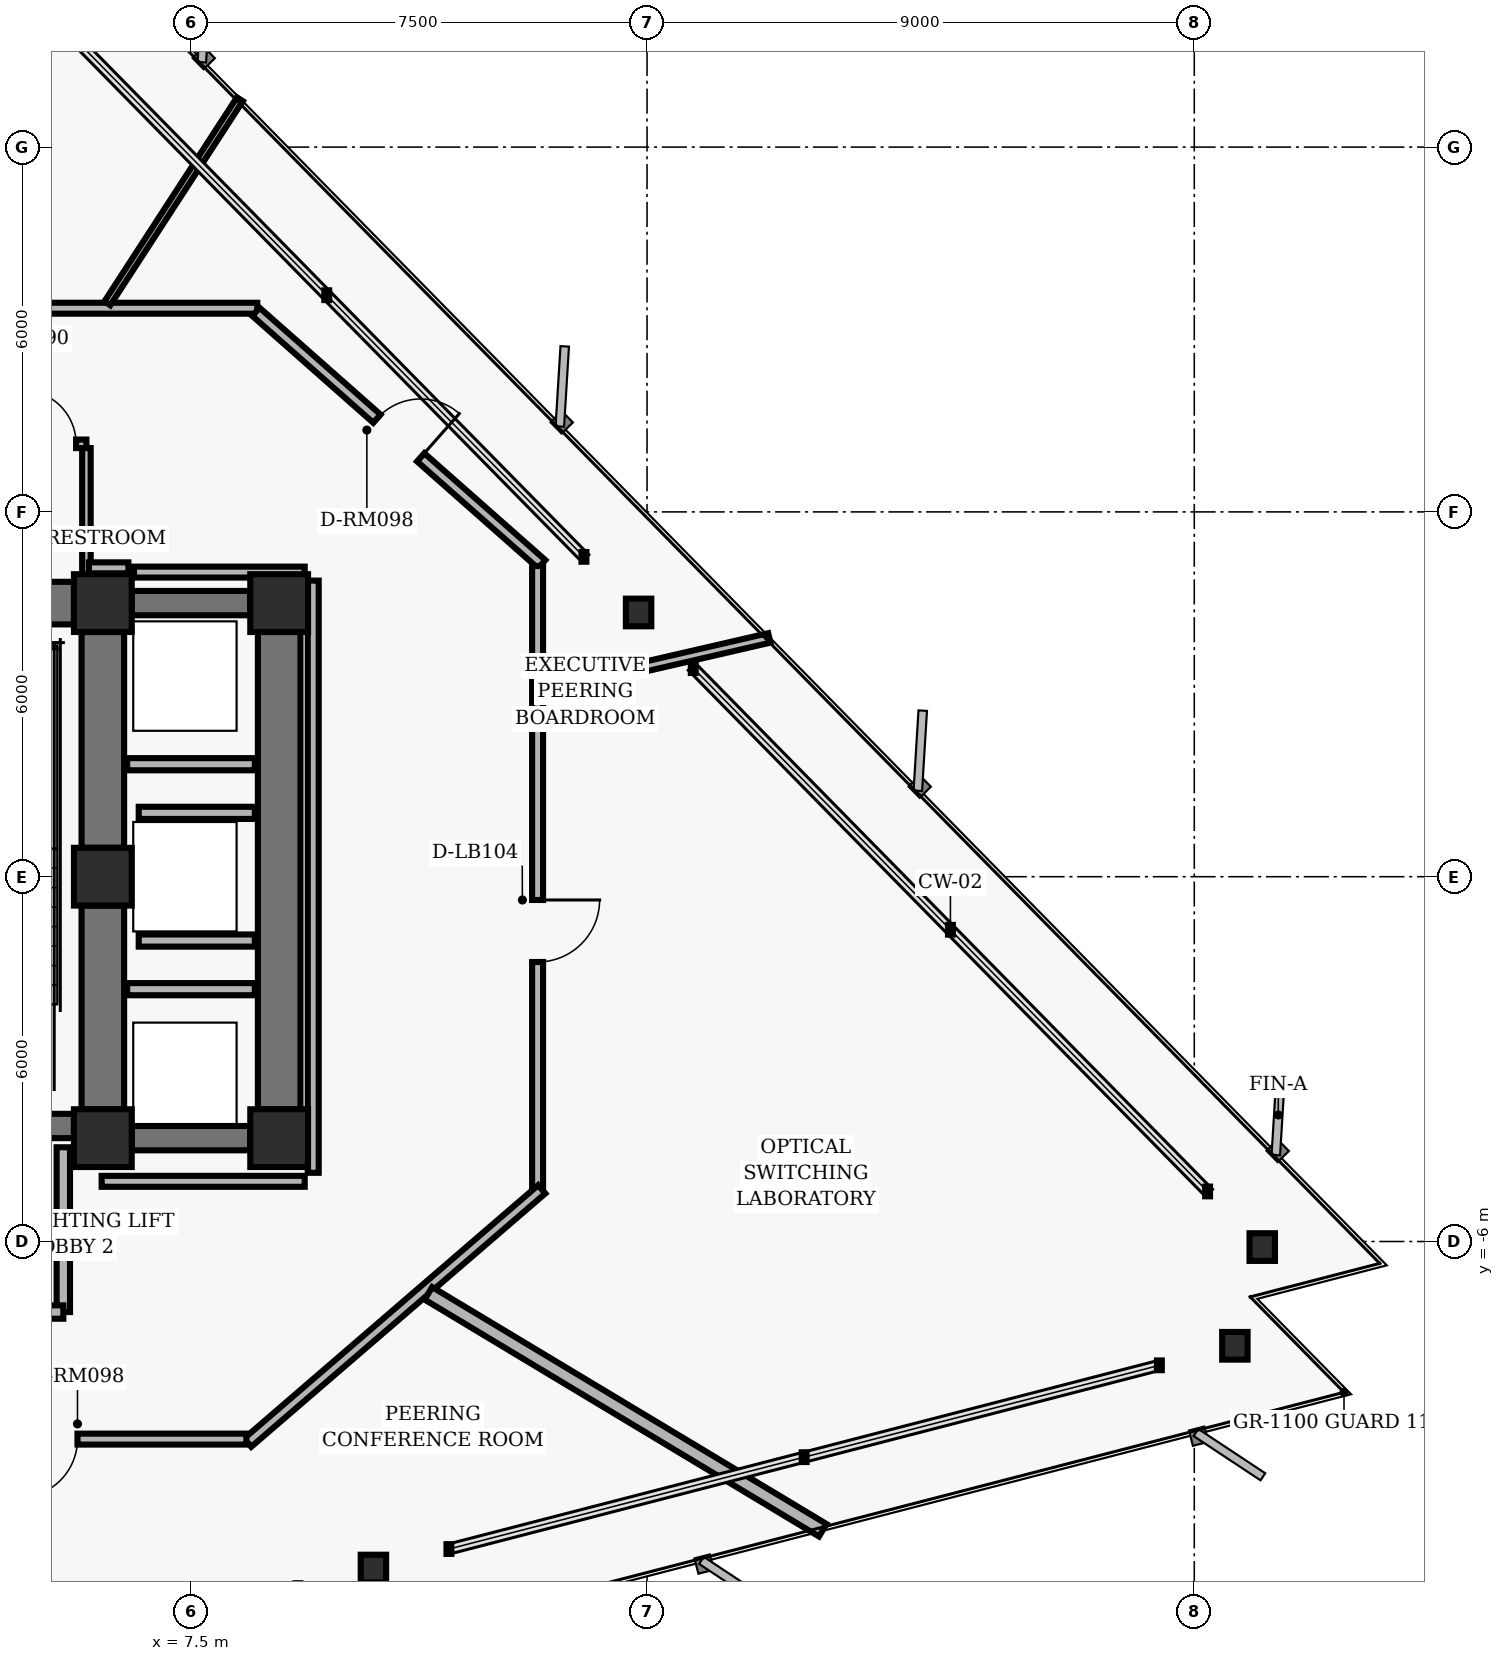
"""IFC4 building model, lengths in metres.
Left out: names, types, materials, properties, quantities, classifications, styles, units other than length and angle.
Written with IfcOpenShell. Run it as: python <this file> out.ifc"""

import sys

from ifc_helpers import new_model, si_unit, direction, frame, frame_2d, origin, origin_2d, place, context, subcontext, project, spatial, rectangle, hollow_rectangle, i_section, extrude, element, fill, save


model = new_model("IFC4")
c1 = context("Model", 3, precision=1e-05, world=origin(), true_north=direction((0.0, 1.0)))
c2 = subcontext(c1, "Body", "Model", "MODEL_VIEW")
j1 = project(units=[si_unit("LENGTHUNIT", "METRE"), si_unit("PLANEANGLEUNIT", "RADIAN")], contexts=[c1])
p1 = place(None, origin())
s1 = spatial("IfcSite", under=j1, at=p1, CompositionType="ELEMENT")
p2 = place(p1, origin())
s2 = spatial("IfcBuilding", under=s1, at=p2, CompositionType="ELEMENT")
p3 = place(p2, frame((0.0, 0.0, 82.56)))
s3 = spatial("IfcBuildingStorey", under=s2, at=p3, CompositionType="ELEMENT", Elevation=82.56)
for number, where, z_axis, x_axis in (
    (1, (6.05, 4.5, 0.0), (0.0, 0.0, 1.0), (1.0, 0.0, 0.0)),
    (2, (6.05, 0.0, 0.0), (0.0, 0.0, 1.0), (1.0, 0.0, 0.0)),
    (3, (6.05, -4.3, 0.0), (0.0, 0.0, 1.0), (1.0, 0.0, 0.0)),
    (4, (8.95, 4.5, 0.0), (0.0, 0.0, 1.0), (1.0, 0.0, 0.0)),
    (5, (8.95, -4.3, 0.0), (0.0, 0.0, 1.0), (1.0, 0.0, 0.0)),
):
    element("IfcColumn", number, at=place(p3, frame(where, z_axis=z_axis, x_axis=x_axis)), inside=s3, PredefinedType="COLUMN", context=c2, shape_type="SweptSolid", body=[
        extrude(hollow_rectangle(XDim=0.95, YDim=0.95, WallThickness=0.06, InnerFilletRadius=0.02, OuterFilletRadius=0.04, at=origin_2d()), origin(), (0.0, 0.0, 1.0), 3.04),
    ])
p4 = place(p3, frame((6.05, 0.475, 0.0), z_axis=(0.0, 0.0, 1.0), x_axis=(0.0, 1.0, 0.0)))
e6 = element("IfcWall", 6, at=p4, inside=s3, PredefinedType="SHEAR", context=c2, shape_type="SweptSolid", body=[
    extrude(rectangle(XDim=3.55, YDim=0.7, at=frame_2d((1.775, 0.0))), origin(), (0.0, 0.0, 1.0), 2.788),
])
p5 = place(p3, frame((6.05, -3.825, 0.0), z_axis=(0.0, 0.0, 1.0), x_axis=(0.0, 1.0, 0.0)))
e7 = element("IfcWall", 7, at=p5, inside=s3, PredefinedType="SHEAR", context=c2, shape_type="SweptSolid", body=[
    extrude(rectangle(XDim=3.35, YDim=0.7, at=frame_2d((1.675, 0.0))), origin(), (0.0, 0.0, 1.0), 2.788),
])
p6 = place(p3, frame((-5.575, -4.1, 0.0), z_axis=(0.0, 0.0, 1.0), x_axis=(1.0, 0.0, 0.0)))
e8 = element("IfcWall", 8, at=p6, inside=s3, PredefinedType="SHEAR", context=c2, shape_type="SweptSolid", body=[
    extrude(rectangle(XDim=11.15, YDim=0.4, at=frame_2d((5.575, 0.0))), origin(), (0.0, 0.0, 1.0), 2.788),
])
p7 = place(p6, frame((1.305, 0.0, 0.0)))
e9 = element("IfcOpeningElement", 9, at=p7, cuts=e8, PredefinedType="OPENING", context=c2, shape_type="SweptSolid", body=[
    extrude(rectangle(XDim=1.1, YDim=2.04, at=frame_2d((0.55, 1.02))), frame((0.0, 0.21, 0.0), z_axis=(0.0, -1.0, 0.0), x_axis=(1.0, 0.0, 0.0)), (0.0, 0.0, 1.0), 0.42),
])
p8 = place(p6, frame((8.745, 0.0, 0.0)))
e10 = element("IfcOpeningElement", 10, at=p8, cuts=e8, PredefinedType="OPENING", context=c2, shape_type="SweptSolid", body=[
    extrude(rectangle(XDim=1.1, YDim=2.04, at=frame_2d((0.55, 1.02))), frame((0.0, 0.21, 0.0), z_axis=(0.0, -1.0, 0.0), x_axis=(1.0, 0.0, 0.0)), (0.0, 0.0, 1.0), 0.42),
])
p9 = place(p6, frame((4.045, 0.0, 0.0)))
e11 = element("IfcOpeningElement", 11, at=p9, cuts=e8, PredefinedType="OPENING", context=c2, shape_type="SweptSolid", body=[
    extrude(rectangle(XDim=1.06, YDim=2.04, at=frame_2d((0.53, 1.02))), frame((0.0, 0.21, 0.0), z_axis=(0.0, -1.0, 0.0), x_axis=(1.0, 0.0, 0.0)), (0.0, 0.0, 1.0), 0.42),
])
p10 = place(p6, frame((6.045, 0.0, 0.0)))
e12 = element("IfcOpeningElement", 12, at=p10, cuts=e8, PredefinedType="OPENING", context=c2, shape_type="SweptSolid", body=[
    extrude(rectangle(XDim=1.06, YDim=2.04, at=frame_2d((0.53, 1.02))), frame((0.0, 0.21, 0.0), z_axis=(0.0, -1.0, 0.0), x_axis=(1.0, 0.0, 0.0)), (0.0, 0.0, 1.0), 0.42),
])
p11 = place(p3, frame((2.05, 4.5, 0.0), z_axis=(0.0, 0.0, 1.0), x_axis=(1.0, 0.0, 0.0)))
e13 = element("IfcWall", 13, at=p11, inside=s3, PredefinedType="SHEAR", context=c2, shape_type="SweptSolid", body=[
    extrude(rectangle(XDim=3.525, YDim=0.7, at=frame_2d((1.762, 0.0))), origin(), (0.0, 0.0, 1.0), 2.788),
])
p12 = place(p3, frame((8.95, -3.825, 0.0), z_axis=(0.0, 0.0, 1.0), x_axis=(0.0, 1.0, 0.0)))
e14 = element("IfcWall", 14, at=p12, inside=s3, PredefinedType="SHEAR", context=c2, shape_type="SweptSolid", body=[
    extrude(rectangle(XDim=7.85, YDim=0.7, at=frame_2d((3.925, 0.0))), origin(), (0.0, 0.0, 1.0), 2.788),
])
for number, where, z_axis, x_axis in (
    (15, (6.525, 4.5, 0.0), (0.0, 0.0, 1.0), (1.0, 0.0, 0.0)),
    (16, (6.525, -4.3, 0.0), (0.0, 0.0, 1.0), (1.0, 0.0, 0.0)),
):
    element("IfcWall", number, at=place(p3, frame(where, z_axis=z_axis, x_axis=x_axis)), inside=s3, PredefinedType="SHEAR", context=c2, shape_type="SweptSolid", body=[
        extrude(rectangle(XDim=1.95, YDim=0.4, at=frame_2d((0.975, 0.0))), origin(), (0.0, 0.0, 1.0), 2.788),
    ])
for number, where, z_axis, x_axis in (
    (17, (25.118, -6.092, 0.0), (0.0, 0.0, 1.0), (1.0, 0.0, 0.0)),
    (18, (14.861, 4.346, 0.0), (0.0, 0.0, 1.0), (1.0, 0.0, 0.0)),
    (19, (10.5, -11.379, 0.0), (0.0, 0.0, 1.0), (1.0, 0.0, 0.0)),
    (20, (24.667, -7.715, 0.0), (0.0, 0.0, 1.0), (1.0, 0.0, 0.0)),
):
    element("IfcColumn", number, at=place(p3, frame(where, z_axis=z_axis, x_axis=x_axis)), inside=s3, PredefinedType="COLUMN", context=c2, shape_type="SweptSolid", body=[
        extrude(i_section(OverallWidth=0.418, OverallDepth=0.455, WebThickness=0.042, FlangeThickness=0.068, FilletRadius=0.025, at=origin_2d()), origin(), (0.0, 0.0, 1.0), 3.04),
    ])
p13 = place(p3, frame((5.4, -7.16, 0.0), z_axis=(0.0, 0.0, 1.0), x_axis=(0.0, 1.0, 0.0)))
e21 = element("IfcWall", 21, at=p13, inside=s3, PredefinedType="PARTITIONING", context=c2, shape_type="SweptSolid", body=[
    extrude(rectangle(XDim=2.71, YDim=0.22, at=frame_2d((1.355, 0.0))), origin(), (0.0, 0.0, 1.0), 2.763),
])
p14 = place(p3, frame((0.0, -7.16, 0.0), z_axis=(0.0, 0.0, 1.0), x_axis=(1.0, 0.0, 0.0)))
e22 = element("IfcWall", 22, at=p14, inside=s3, PredefinedType="PARTITIONING", context=c2, shape_type="SweptSolid", body=[
    extrude(rectangle(XDim=5.4, YDim=0.22, at=frame_2d((2.7, 0.0))), origin(), (0.0, 0.0, 1.0), 2.763),
])
p15 = place(p14, frame((2.05, 0.0, 0.0)))
e23 = element("IfcOpeningElement", 23, at=p15, cuts=e22, PredefinedType="OPENING", context=c2, shape_type="SweptSolid", body=[
    extrude(rectangle(XDim=1.12, YDim=2.02, at=frame_2d((0.56, 1.01))), frame((0.0, 0.12, 0.0), z_axis=(0.0, -1.0, 0.0), x_axis=(1.0, 0.0, 0.0)), (0.0, 0.0, 1.0), 0.24),
])
p16 = place(p3, frame((5.78, 4.95, 0.0), z_axis=(0.0, 0.0, 1.0), x_axis=(0.0, 1.0, 0.0)))
e24 = element("IfcWall", 24, at=p16, inside=s3, PredefinedType="PARTITIONING", context=c2, shape_type="SweptSolid", body=[
    extrude(rectangle(XDim=2.1, YDim=0.14, at=frame_2d((1.05, 0.0))), origin(), (0.0, 0.0, 1.0), 2.763),
])
p17 = place(p3, frame((4.56, 7.12, 0.0), z_axis=(0.0, 0.0, 1.0), x_axis=(1.0, 0.0, 0.0)))
e25 = element("IfcWall", 25, at=p17, inside=s3, PredefinedType="PARTITIONING", context=c2, shape_type="SweptSolid", body=[
    extrude(rectangle(XDim=1.22, YDim=0.14, at=frame_2d((0.61, 0.0))), origin(), (0.0, 0.0, 1.0), 2.763),
])
p18 = place(p17, frame((0.17, 0.0, 0.0)))
e26 = element("IfcOpeningElement", 26, at=p18, cuts=e25, PredefinedType="OPENING", context=c2, shape_type="SweptSolid", body=[
    extrude(rectangle(XDim=0.88, YDim=2.02, at=frame_2d((0.44, 1.01))), frame((0.0, 0.08, 0.0), z_axis=(0.0, -1.0, 0.0), x_axis=(1.0, 0.0, 0.0)), (0.0, 0.0, 1.0), 0.16),
])
for number, where, z_axis, x_axis in (
    (27, (6.45, -1.85, 0.0), (0.0, 0.0, 1.0), (1.0, 0.0, 0.0)),
    (28, (6.45, 1.85, 0.0), (0.0, 0.0, 1.0), (1.0, 0.0, 0.0)),
):
    element("IfcWall", number, at=place(p3, frame(where, z_axis=z_axis, x_axis=x_axis)), inside=s3, PredefinedType="PARTITIONING", context=c2, shape_type="SweptSolid", body=[
        extrude(rectangle(XDim=2.1, YDim=0.2, at=frame_2d((1.05, 0.0))), origin(), (0.0, 0.0, 1.0), 2.763),
    ])
for number, where, z_axis, x_axis in (
    (29, (6.64, -1.05, 0.0), (0.0, 0.0, 1.0), (1.0, 0.0, 0.0)),
    (30, (6.64, 1.05, 0.0), (0.0, 0.0, 1.0), (1.0, 0.0, 0.0)),
):
    element("IfcWall", number, at=place(p3, frame(where, z_axis=z_axis, x_axis=x_axis)), inside=s3, PredefinedType="PARTITIONING", context=c2, shape_type="SweptSolid", body=[
        extrude(rectangle(XDim=1.91, YDim=0.2, at=frame_2d((0.955, 0.0))), origin(), (0.0, 0.0, 1.0), 2.763),
    ])
p19 = place(p3, frame((-8.59, 9.35, 0.0), z_axis=(0.0, 0.0, 1.0), x_axis=(1.0, 0.0, 0.0)))
e31 = element("IfcWall", 31, at=p19, inside=s3, PredefinedType="PARTITIONING", context=c2, shape_type="SweptSolid", body=[
    extrude(rectangle(XDim=17.18, YDim=0.18, at=frame_2d((8.59, 0.0))), origin(), (0.0, 0.0, 1.0), 2.277),
])
p20 = place(p19, frame((10.261, 0.0, 0.0)))
e32 = element("IfcOpeningElement", 32, at=p20, cuts=e31, PredefinedType="OPENING", context=c2, shape_type="SweptSolid", body=[
    extrude(rectangle(XDim=0.96, YDim=2.02, at=frame_2d((0.48, 1.01))), frame((0.0, 0.1, 0.0), z_axis=(0.0, -1.0, 0.0), x_axis=(1.0, 0.0, 0.0)), (0.0, 0.0, 1.0), 0.2),
])
p21 = place(p19, frame((3.028, 0.0, 0.0)))
e33 = element("IfcOpeningElement", 33, at=p21, cuts=e31, PredefinedType="OPENING", context=c2, shape_type="SweptSolid", body=[
    extrude(rectangle(XDim=0.96, YDim=2.02, at=frame_2d((0.48, 1.01))), frame((0.0, 0.1, 0.0), z_axis=(0.0, -1.0, 0.0), x_axis=(1.0, 0.0, 0.0)), (0.0, 0.0, 1.0), 0.2),
])
p22 = place(p3, frame((8.567, 9.29, 0.0), z_axis=(0.0, 0.0, 1.0), x_axis=(0.749626463267, -0.66186113768, 0.0)))
e34 = element("IfcWall", 34, at=p22, inside=s3, PredefinedType="PARTITIONING", context=c2, shape_type="SweptSolid", body=[
    extrude(rectangle(XDim=6.27, YDim=0.18, at=frame_2d((3.135, 0.0))), origin(), (0.0, 0.0, 1.0), 2.277),
])
p23 = place(p22, frame((2.655, 0.0, 0.0)))
e35 = element("IfcOpeningElement", 35, at=p23, cuts=e34, PredefinedType="OPENING", context=c2, shape_type="SweptSolid", body=[
    extrude(rectangle(XDim=0.96, YDim=2.02, at=frame_2d((0.48, 1.01))), frame((0.0, 0.1, 0.0), z_axis=(0.0, -1.0, 0.0), x_axis=(1.0, 0.0, 0.0)), (0.0, 0.0, 1.0), 0.2),
])
p24 = place(p3, frame((13.2, 5.11, 0.0), z_axis=(0.0, 0.0, 1.0), x_axis=(0.0, -1.0, 0.0)))
e36 = element("IfcWall", 36, at=p24, inside=s3, PredefinedType="PARTITIONING", context=c2, shape_type="SweptSolid", body=[
    extrude(rectangle(XDim=10.22, YDim=0.18, at=frame_2d((5.11, 0.0))), origin(), (0.0, 0.0, 1.0), 2.277),
])
p25 = place(p24, frame((5.493, 0.0, 0.0)))
e37 = element("IfcOpeningElement", 37, at=p25, cuts=e36, PredefinedType="OPENING", context=c2, shape_type="SweptSolid", body=[
    extrude(rectangle(XDim=1.02, YDim=2.02, at=frame_2d((0.51, 1.01))), frame((0.0, 0.1, 0.0), z_axis=(0.0, -1.0, 0.0), x_axis=(1.0, 0.0, 0.0)), (0.0, 0.0, 1.0), 0.2),
])
p26 = place(p3, frame((13.268, -5.141, 0.0), z_axis=(0.0, 0.0, 1.0), x_axis=(-0.757534501725, -0.65279512766, 0.0)))
e38 = element("IfcWall", 38, at=p26, inside=s3, PredefinedType="PARTITIONING", context=c2, shape_type="SweptSolid", body=[
    extrude(rectangle(XDim=6.385, YDim=0.18, at=frame_2d((3.192, 0.0))), origin(), (0.0, 0.0, 1.0), 2.763),
])
p27 = place(p3, frame((8.41, -9.25, 0.0), z_axis=(0.0, 0.0, 1.0), x_axis=(-1.0, 0.0, 0.0)))
e39 = element("IfcWall", 39, at=p27, inside=s3, PredefinedType="PARTITIONING", context=c2, shape_type="SweptSolid", body=[
    extrude(rectangle(XDim=17.0, YDim=0.18, at=frame_2d((8.5, 0.0))), origin(), (0.0, 0.0, 1.0), 2.277),
])
p28 = place(p27, frame((9.888, 0.0, 0.0)))
e40 = element("IfcOpeningElement", 40, at=p28, cuts=e39, PredefinedType="OPENING", context=c2, shape_type="SweptSolid", body=[
    extrude(rectangle(XDim=0.96, YDim=2.02, at=frame_2d((0.48, 1.01))), frame((0.0, 0.1, 0.0), z_axis=(0.0, -1.0, 0.0), x_axis=(1.0, 0.0, 0.0)), (0.0, 0.0, 1.0), 0.2),
])
p29 = place(p27, frame((2.777, 0.0, 0.0)))
e41 = element("IfcOpeningElement", 41, at=p29, cuts=e39, PredefinedType="OPENING", context=c2, shape_type="SweptSolid", body=[
    extrude(rectangle(XDim=0.96, YDim=2.02, at=frame_2d((0.48, 1.01))), frame((0.0, 0.1, 0.0), z_axis=(0.0, -1.0, 0.0), x_axis=(1.0, 0.0, 0.0)), (0.0, 0.0, 1.0), 0.2),
])
p30 = place(p3, frame((6.03, -5.01, 0.0), z_axis=(0.0, 0.0, 1.0), x_axis=(1.0, 0.0, 0.0)))
e42 = element("IfcWall", 42, at=p30, inside=s3, PredefinedType="PARTITIONING", context=c2, shape_type="SweptSolid", body=[
    extrude(rectangle(XDim=3.34, YDim=0.18, at=frame_2d((1.67, 0.0))), origin(), (0.0, 0.0, 1.0), 2.763),
])
p31 = place(p3, frame((9.51, -4.87, 0.0), z_axis=(0.0, 0.0, 1.0), x_axis=(0.0, 1.0, 0.0)))
e43 = element("IfcWall", 43, at=p31, inside=s3, PredefinedType="PARTITIONING", context=c2, shape_type="SweptSolid", body=[
    extrude(rectangle(XDim=9.74, YDim=0.18, at=frame_2d((4.87, 0.0))), origin(), (0.0, 0.0, 1.0), 2.048),
])
p32 = place(p3, frame((9.37, 5.01, 0.0), z_axis=(0.0, 0.0, 1.0), x_axis=(-1.0, 0.0, 0.0)))
e44 = element("IfcWall", 44, at=p32, inside=s3, PredefinedType="PARTITIONING", context=c2, shape_type="SweptSolid", body=[
    extrude(rectangle(XDim=2.808, YDim=0.18, at=frame_2d((1.404, 0.0))), origin(), (0.0, 0.0, 1.0), 2.763),
])
p33 = place(p3, frame((6.47, 5.08, 0.0), z_axis=(0.0, 0.0, 1.0), x_axis=(-1.0, 0.0, 0.0)))
e45 = element("IfcWall", 45, at=p33, inside=s3, PredefinedType="PARTITIONING", context=c2, shape_type="SweptSolid", body=[
    extrude(rectangle(XDim=0.65, YDim=0.18, at=frame_2d((0.325, 0.0))), origin(), (0.0, 0.0, 1.0), 2.763),
])
p34 = place(p3, frame((11.405, -6.853, 0.0), z_axis=(0.0, 0.0, 1.0), x_axis=(0.857165278127, -0.515041441025, 0.0)))
e46 = element("IfcWall", 46, at=p34, inside=s3, PredefinedType="PARTITIONING", context=c2, shape_type="SweptSolid", body=[
    extrude(rectangle(XDim=7.565, YDim=0.24, at=frame_2d((3.782, 0.0))), origin(), (0.0, 0.0, 1.0), 2.763),
])
p35 = place(p3, frame((13.28, 3.066, 0.0), z_axis=(0.0, 0.0, 1.0), x_axis=(0.974371849336, 0.224943324464, 0.0)))
e47 = element("IfcWall", 47, at=p35, inside=s3, PredefinedType="PARTITIONING", context=c2, shape_type="SweptSolid", body=[
    extrude(rectangle(XDim=3.829, YDim=0.16, at=frame_2d((1.915, 0.0))), origin(), (0.0, 0.0, 1.0), 2.763),
])
p36 = place(p3, frame((6.124, 9.43, 0.0), z_axis=(0.0, 0.0, 1.0), x_axis=(0.544653909872, 0.838660907912, 0.0)))
e48 = element("IfcWall", 48, at=p36, inside=s3, PredefinedType="MOVABLE", context=c2, shape_type="SweptSolid", body=[
    extrude(rectangle(XDim=4.003, YDim=0.115, at=frame_2d((2.002, 0.0))), origin(), (0.0, 0.0, 1.0), 2.763),
])
p37 = place(p18, origin())
e49 = element("IfcDoor", 49, at=p37, inside=s3, OperationType="SINGLE_SWING_LEFT", PredefinedType="DOOR", context=c2, shape_type="SweptSolid", body=[
    extrude(rectangle(XDim=0.88, YDim=2.02, at=frame_2d((0.44, 1.01))), frame((0.0, 0.025, 0.0), z_axis=(0.0, -1.0, 0.0), x_axis=(1.0, 0.0, 0.0)), (0.0, 0.0, 1.0), 0.05),
])
fill(e26, e49)
p38 = place(p29, origin())
e50 = element("IfcDoor", 50, at=p38, inside=s3, OperationType="SINGLE_SWING_RIGHT", PredefinedType="DOOR", context=c2, shape_type="SweptSolid", body=[
    extrude(rectangle(XDim=0.96, YDim=2.02, at=frame_2d((0.48, 1.01))), frame((0.0, 0.025, 0.0), z_axis=(0.0, -1.0, 0.0), x_axis=(1.0, 0.0, 0.0)), (0.0, 0.0, 1.0), 0.05),
])
fill(e41, e50)
p39 = place(p25, origin())
e51 = element("IfcDoor", 51, at=p39, inside=s3, OperationType="SINGLE_SWING_LEFT", PredefinedType="DOOR", context=c2, shape_type="SweptSolid", body=[
    extrude(rectangle(XDim=1.02, YDim=2.02, at=frame_2d((0.51, 1.01))), frame((0.0, 0.025, 0.0), z_axis=(0.0, -1.0, 0.0), x_axis=(1.0, 0.0, 0.0)), (0.0, 0.0, 1.0), 0.05),
])
fill(e37, e51)
p40 = place(p23, origin())
e52 = element("IfcDoor", 52, at=p40, inside=s3, OperationType="SINGLE_SWING_RIGHT", PredefinedType="DOOR", context=c2, shape_type="SweptSolid", body=[
    extrude(rectangle(XDim=0.96, YDim=2.02, at=frame_2d((0.48, 1.01))), frame((0.0, 0.025, 0.0), z_axis=(0.0, -1.0, 0.0), x_axis=(1.0, 0.0, 0.0)), (0.0, 0.0, 1.0), 0.05),
])
fill(e35, e52)
save(model, sys.argv[1])
